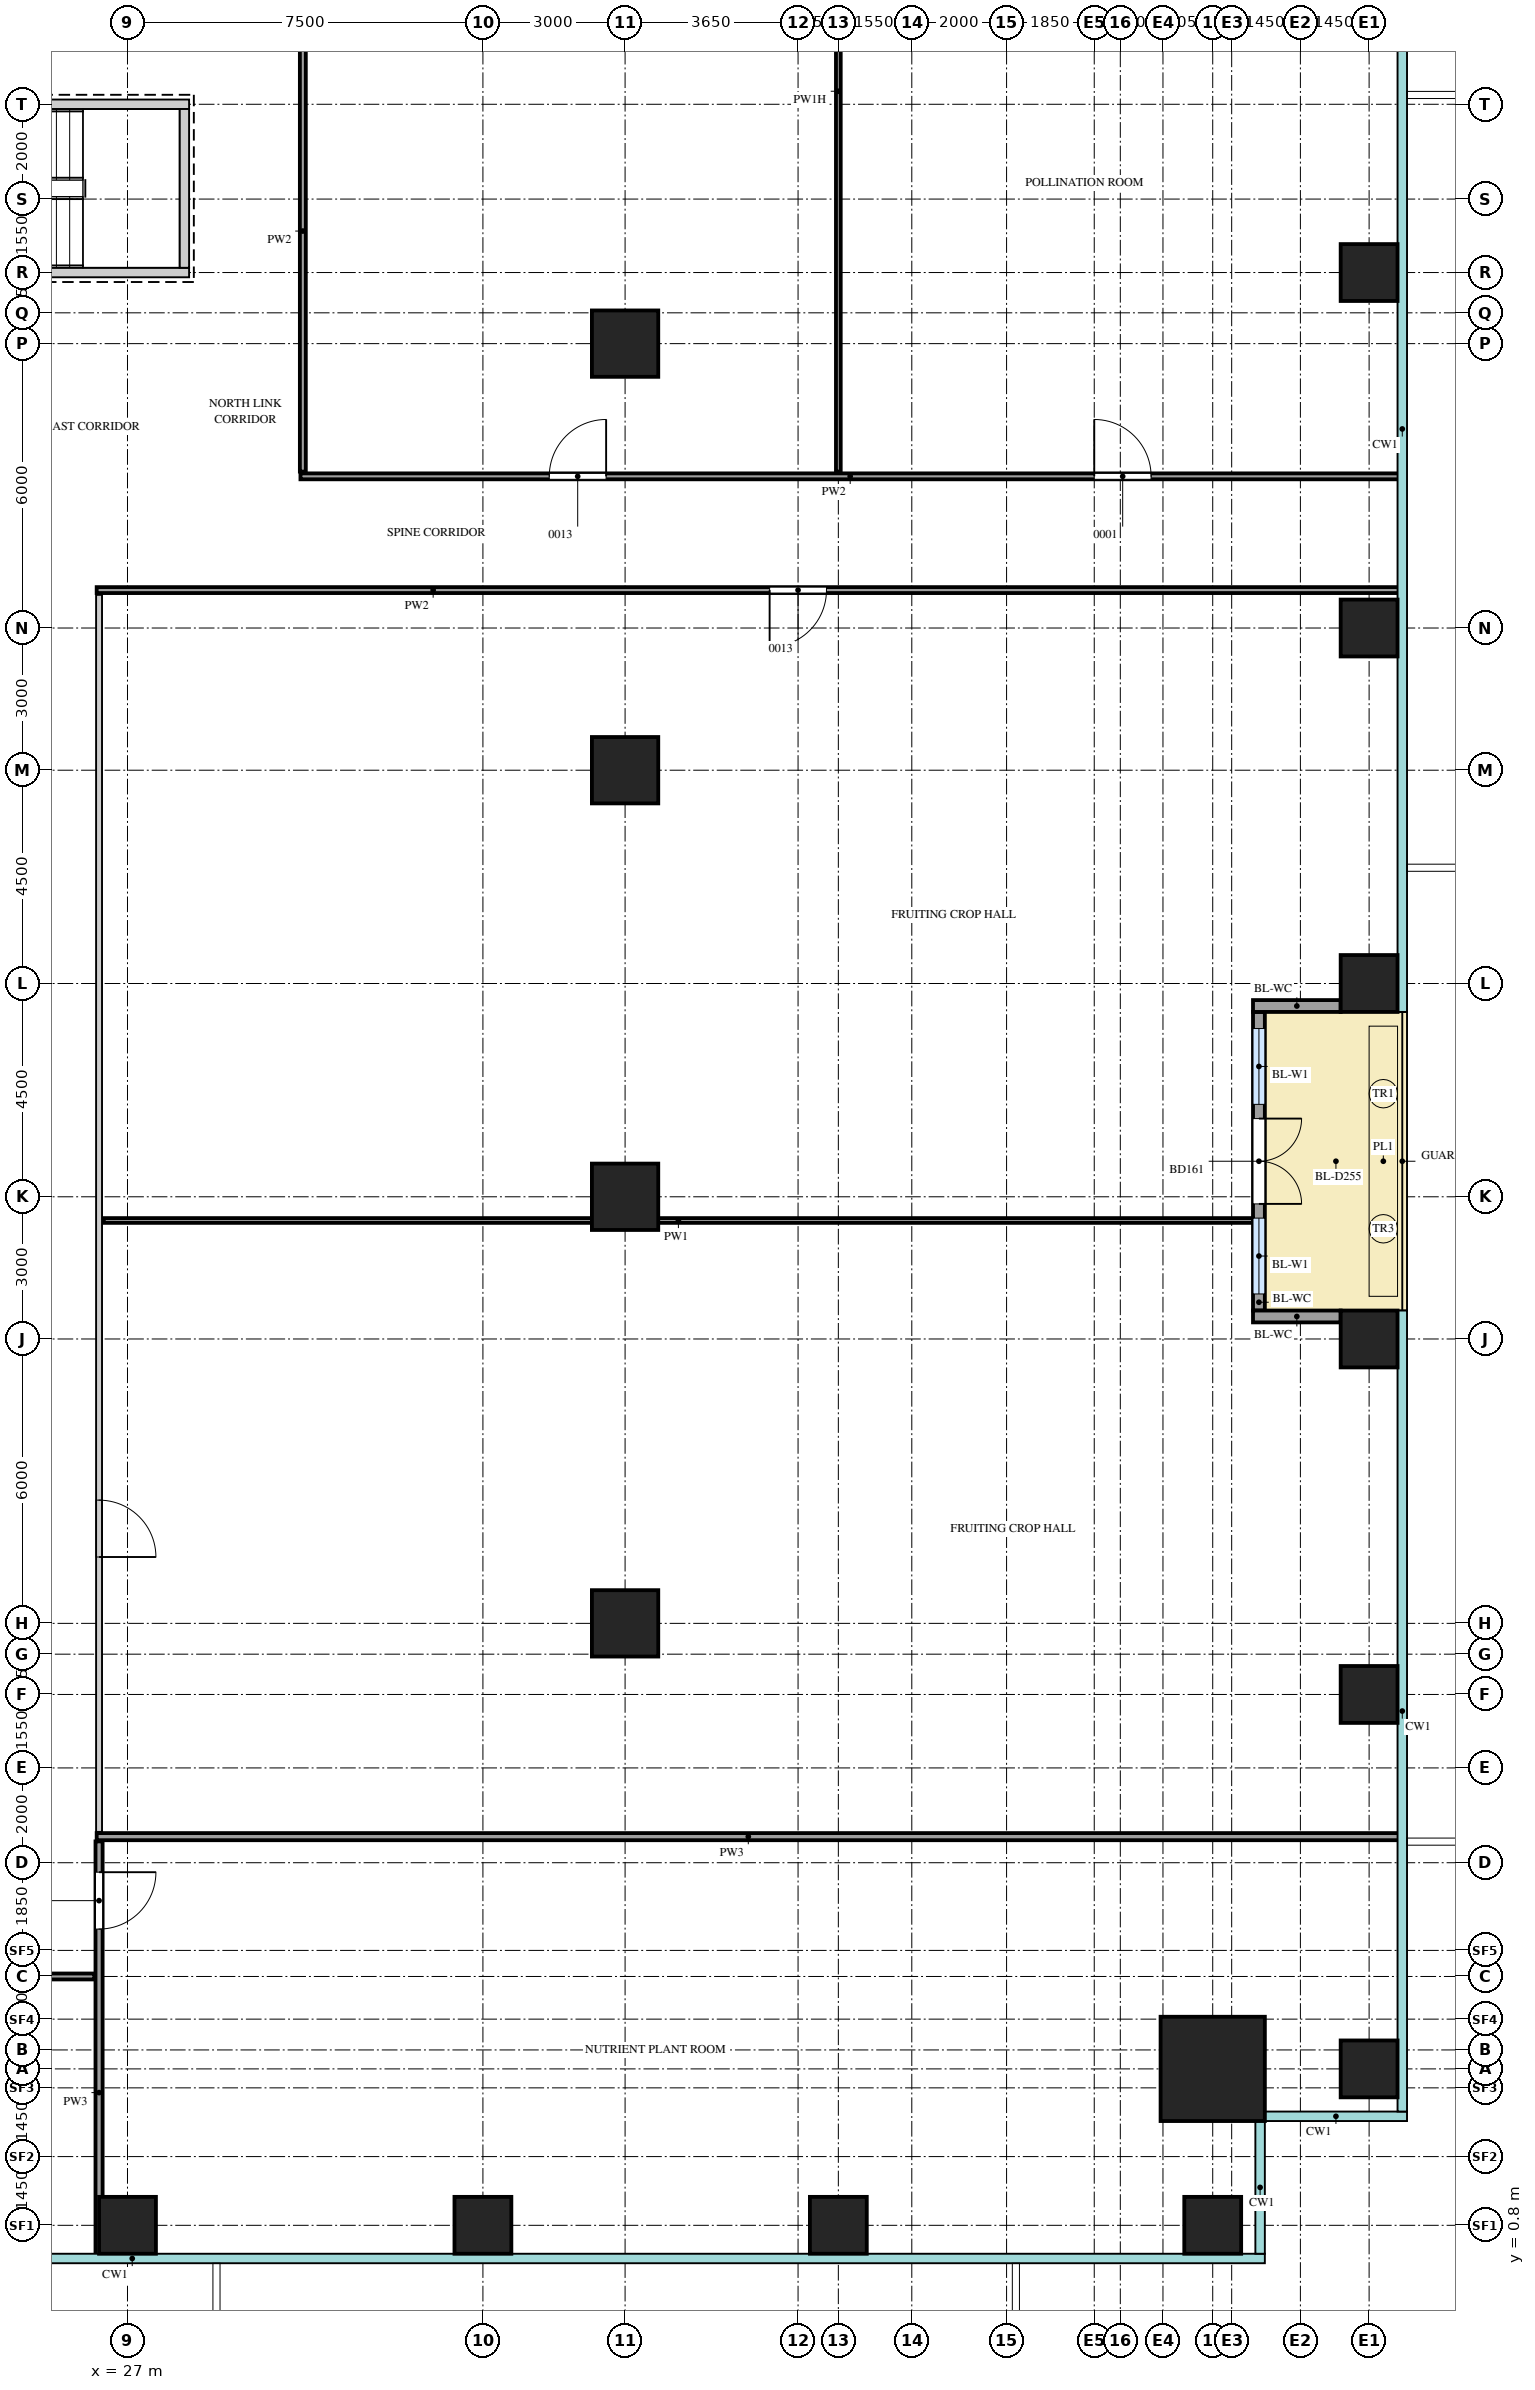
"""IFC4 building model, lengths in metres.
Left out: names, types, materials, properties, quantities, classifications, styles, units other than length and angle.
Written with IfcOpenShell. Run it as: python <this file> out.ifc"""

import sys

from ifc_helpers import new_model, si_unit, direction, frame, frame_2d, origin, origin_2d, place, context, subcontext, project, spatial, rectangle, extrude, source, transform, mapped, element, fill, save


model = new_model("IFC4")
c1 = context("Model", 3, precision=1e-05, world=origin(), true_north=direction((0.0, 1.0)))
c2 = subcontext(c1, "Body", "Model", "MODEL_VIEW")
j1 = project(units=[si_unit("LENGTHUNIT", "METRE"), si_unit("PLANEANGLEUNIT", "RADIAN")], contexts=[c1])
p1 = place(None, origin())
s1 = spatial("IfcSite", under=j1, at=p1, CompositionType="ELEMENT")
p2 = place(p1, origin())
s2 = spatial("IfcBuilding", under=s1, at=p2, CompositionType="ELEMENT")
p3 = place(p2, frame((0.0, 0.0, 78.0)))
s3 = spatial("IfcBuildingStorey", under=s2, at=p3, CompositionType="ELEMENT", Elevation=78.0)
m1 = source(origin(), c2, "Body", "SweptSolid", [
    extrude(rectangle(XDim=7.1, YDim=0.2, at=frame_2d((3.55, 0.0))), origin(), (0.0, 0.0, 1.0), 4.2),
])
p4 = place(p3, frame((21.2, 45.55, 0.0), z_axis=(0.0, 0.0, 1.0), x_axis=(1.0, 0.0, 0.0)))
e1 = element("IfcWall", 1, at=p4, inside=s3, PredefinedType="SHEAR", context=c2, shape_type="MappedRepresentation", body=[
    mapped(m1, transform((0.0, 0.0, 0.0))),
])
m2 = source(origin(), c2, "Body", "SweptSolid", [
    extrude(rectangle(XDim=1.2, YDim=2.1, at=frame_2d((0.6, 1.05))), frame((0.0, 0.11, 0.0), z_axis=(0.0, -1.0, 0.0), x_axis=(1.0, 0.0, 0.0)), (0.0, 0.0, 1.0), 0.22),
])
p5 = place(p4, frame((0.15, 0.0, 0.0)))
e2 = element("IfcOpeningElement", 2, at=p5, cuts=e1, PredefinedType="OPENING", context=c2, shape_type="MappedRepresentation", body=[
    mapped(m2, transform((0.0, 0.0, 0.0))),
])
p6 = place(p3, frame((21.2, 42.0, 0.0), z_axis=(0.0, 0.0, 1.0), x_axis=(1.0, 0.0, 0.0)))
e3 = element("IfcWall", 3, at=p6, inside=s3, PredefinedType="SHEAR", context=c2, shape_type="MappedRepresentation", body=[
    mapped(m1, transform((0.0, 0.0, 0.0))),
])
m3 = source(origin(), c2, "Body", "SweptSolid", [
    extrude(rectangle(XDim=3.35, YDim=0.2, at=frame_2d((1.675, 0.0))), origin(), (0.0, 0.0, 1.0), 4.2),
])
p7 = place(p3, frame((28.2, 42.1, 0.0), z_axis=(0.0, 0.0, 1.0), x_axis=(0.0, 1.0, 0.0)))
e4 = element("IfcWall", 4, at=p7, inside=s3, PredefinedType="SHEAR", context=c2, shape_type="MappedRepresentation", body=[
    mapped(m3, transform((0.0, 0.0, 0.0))),
])
m4 = source(origin(), c2, "Body", "SweptSolid", [
    extrude(rectangle(XDim=2.2, YDim=2.2, at=origin_2d()), origin(), (0.0, 0.0, 1.0), 4.5),
])
p8 = place(p3, frame((49.9, 4.1, 0.0), z_axis=(0.0, 0.0, 1.0), x_axis=(1.0, 0.0, 0.0)))
e5 = element("IfcColumn", 5, at=p8, inside=s3, PredefinedType="COLUMN", context=c2, shape_type="MappedRepresentation", body=[
    mapped(m4, transform((0.0, 0.0, 0.0))),
])
m5 = source(origin(), c2, "Body", "SweptSolid", [
    extrude(rectangle(XDim=1.2, YDim=1.2, at=origin_2d()), origin(), (0.0, 0.0, 1.0), 4.2),
])
for number, where, z_axis, x_axis in (
    (6, (27.0, 0.8, 0.0), (0.0, 0.0, 1.0), (1.0, 0.0, 0.0)),
    (7, (34.5, 0.8, 0.0), (0.0, 0.0, 1.0), (1.0, 0.0, 0.0)),
    (8, (42.0, 0.8, 0.0), (0.0, 0.0, 1.0), (1.0, 0.0, 0.0)),
    (9, (49.9, 0.8, 0.0), (0.0, 0.0, 1.0), (1.0, 0.0, 0.0)),
    (10, (53.2, 4.1, 0.0), (0.0, 0.0, 1.0), (1.0, 0.0, 0.0)),
    (11, (53.2, 12.0, 0.0), (0.0, 0.0, 1.0), (1.0, 0.0, 0.0)),
    (12, (53.2, 19.5, 0.0), (0.0, 0.0, 1.0), (1.0, 0.0, 0.0)),
    (13, (53.2, 27.0, 0.0), (0.0, 0.0, 1.0), (1.0, 0.0, 0.0)),
    (14, (53.2, 34.5, 0.0), (0.0, 0.0, 1.0), (1.0, 0.0, 0.0)),
    (15, (53.2, 42.0, 0.0), (0.0, 0.0, 1.0), (1.0, 0.0, 0.0)),
):
    element("IfcColumn", number, at=place(p3, frame(where, z_axis=z_axis, x_axis=x_axis)), inside=s3, PredefinedType="COLUMN", context=c2, shape_type="MappedRepresentation", body=[
        mapped(m5, transform((0.0, 0.0, 0.0))),
    ])
m6 = source(origin(), c2, "Body", "SweptSolid", [
    extrude(rectangle(XDim=1.4, YDim=1.4, at=origin_2d()), origin(), (0.0, 0.0, 1.0), 4.2),
])
for number, where, z_axis, x_axis in (
    (16, (37.5, 13.5, 0.0), (0.0, 0.0, 1.0), (1.0, 0.0, 0.0)),
    (17, (37.5, 22.5, 0.0), (0.0, 0.0, 1.0), (1.0, 0.0, 0.0)),
    (18, (37.5, 31.5, 0.0), (0.0, 0.0, 1.0), (1.0, 0.0, 0.0)),
    (19, (37.5, 40.5, 0.0), (0.0, 0.0, 1.0), (1.0, 0.0, 0.0)),
):
    element("IfcColumn", number, at=place(p3, frame(where, z_axis=z_axis, x_axis=x_axis)), inside=s3, PredefinedType="COLUMN", context=c2, shape_type="MappedRepresentation", body=[
        mapped(m6, transform((0.0, 0.0, 0.0))),
    ])
m7 = source(origin(), c2, "Body", "SweptSolid", [
    extrude(rectangle(XDim=6.3, YDim=0.25, at=frame_2d((3.15, 0.0))), origin(), (0.0, 0.0, 1.0), 3.6),
])
p9 = place(p3, frame((50.875, 20.1, 0.0), z_axis=(0.0, 0.0, 1.0), x_axis=(0.0, 1.0, 0.0)))
e20 = element("IfcWall", 20, at=p9, inside=s3, PredefinedType="SOLIDWALL", context=c2, shape_type="MappedRepresentation", body=[
    mapped(m7, transform((0.0, 0.0, 0.0))),
])
m8 = source(origin(), c2, "Body", "SweptSolid", [
    extrude(rectangle(XDim=1.6, YDim=2.4, at=frame_2d((0.8, 1.2))), frame((0.0, 0.135, 0.0), z_axis=(0.0, -1.0, 0.0), x_axis=(1.0, 0.0, 0.0)), (0.0, 0.0, 1.0), 0.27),
])
p10 = place(p9, frame((0.35, 0.0, 0.0)))
e21 = element("IfcOpeningElement", 21, at=p10, cuts=e20, PredefinedType="OPENING", context=c2, shape_type="MappedRepresentation", body=[
    mapped(m8, transform((0.0, 0.0, 0.0))),
])
p11 = place(p9, frame((4.35, 0.0, 0.0)))
e22 = element("IfcOpeningElement", 22, at=p11, cuts=e20, PredefinedType="OPENING", context=c2, shape_type="MappedRepresentation", body=[
    mapped(m8, transform((0.0, 0.0, 0.0))),
])
m9 = source(origin(), c2, "Body", "SweptSolid", [
    extrude(rectangle(XDim=1.8, YDim=2.4, at=frame_2d((0.9, 1.2))), frame((0.0, 0.135, 0.0), z_axis=(0.0, -1.0, 0.0), x_axis=(1.0, 0.0, 0.0)), (0.0, 0.0, 1.0), 0.27),
])
p12 = place(p9, frame((2.25, 0.0, 0.0)))
e23 = element("IfcOpeningElement", 23, at=p12, cuts=e20, PredefinedType="OPENING", context=c2, shape_type="MappedRepresentation", body=[
    mapped(m9, transform((0.0, 0.0, 0.0))),
])
m10 = source(origin(), c2, "Body", "SweptSolid", [
    extrude(rectangle(XDim=1.85, YDim=0.25, at=frame_2d((0.925, 0.0))), origin(), (0.0, 0.0, 1.0), 3.6),
])
for number, where, z_axis, x_axis in (
    (24, (52.6, 19.975, 0.0), (0.0, 0.0, 1.0), (-1.0, 0.0, 0.0)),
    (25, (52.6, 26.525, 0.0), (0.0, 0.0, 1.0), (-1.0, 0.0, 0.0)),
):
    element("IfcWall", number, at=place(p3, frame(where, z_axis=z_axis, x_axis=x_axis)), inside=s3, PredefinedType="SOLIDWALL", context=c2, shape_type="MappedRepresentation", body=[
        mapped(m10, transform((0.0, 0.0, 0.0))),
    ])
m11 = source(origin(), c2, "Body", "SweptSolid", [
    extrude(rectangle(XDim=8.75, YDim=0.15, at=frame_2d((4.375, 0.0))), origin(), (0.0, 0.0, 1.0), 4.3),
])
p13 = place(p3, frame((26.4, 0.15, 0.0), z_axis=(0.0, 0.0, 1.0), x_axis=(0.0, 1.0, 0.0)))
e26 = element("IfcWall", 26, at=p13, inside=s3, PredefinedType="PARTITIONING", context=c2, shape_type="MappedRepresentation", body=[
    mapped(m11, transform((0.0, 0.0, 0.0))),
])
m12 = source(origin(), c2, "Body", "SweptSolid", [
    extrude(rectangle(XDim=1.2, YDim=2.1, at=frame_2d((0.6, 1.05))), frame((0.0, 0.085, 0.0), z_axis=(0.0, -1.0, 0.0), x_axis=(1.0, 0.0, 0.0)), (0.0, 0.0, 1.0), 0.17),
])
p14 = place(p13, frame((6.9, 0.0, 0.0)))
e27 = element("IfcOpeningElement", 27, at=p14, cuts=e26, PredefinedType="OPENING", context=c2, shape_type="MappedRepresentation", body=[
    mapped(m12, transform((0.0, 0.0, 0.0))),
])
m13 = source(origin(), c2, "Body", "SweptSolid", [
    extrude(rectangle(XDim=22.15, YDim=0.125, at=frame_2d((11.075, 0.0))), origin(), (0.0, 0.0, 1.0), 4.3),
])
p15 = place(p3, frame((4.15, 6.05, 0.0), z_axis=(0.0, 0.0, 1.0), x_axis=(1.0, 0.0, 0.0)))
e28 = element("IfcWall", 28, at=p15, inside=s3, PredefinedType="PARTITIONING", context=c2, shape_type="MappedRepresentation", body=[
    mapped(m13, transform((0.0, 0.0, 0.0))),
])
m14 = source(origin(), c2, "Body", "SweptSolid", [
    extrude(rectangle(XDim=1.2, YDim=2.1, at=frame_2d((0.6, 1.05))), frame((0.0, 0.073, 0.0), z_axis=(0.0, -1.0, 0.0), x_axis=(1.0, 0.0, 0.0)), (0.0, 0.0, 1.0), 0.145),
])
p16 = place(p15, frame((9.2, 0.0, 0.0)))
e29 = element("IfcOpeningElement", 29, at=p16, cuts=e28, PredefinedType="OPENING", context=c2, shape_type="MappedRepresentation", body=[
    mapped(m14, transform((0.0, 0.0, 0.0))),
])
m15 = source(origin(), c2, "Body", "SweptSolid", [
    extrude(rectangle(XDim=27.5, YDim=0.15, at=frame_2d((13.75, 0.0))), origin(), (0.0, 0.0, 1.0), 4.3),
])
p17 = place(p3, frame((26.35, 9.0, 0.0), z_axis=(0.0, 0.0, 1.0), x_axis=(1.0, 0.0, 0.0)))
e30 = element("IfcWall", 30, at=p17, inside=s3, PredefinedType="PARTITIONING", context=c2, shape_type="MappedRepresentation", body=[
    mapped(m15, transform((0.0, 0.0, 0.0))),
])
m16 = source(origin(), c2, "Body", "SweptSolid", [
    extrude(rectangle(XDim=26.1, YDim=0.125, at=frame_2d((13.05, 0.0))), origin(), (0.0, 0.0, 1.0), 4.3),
])
p18 = place(p3, frame((26.4, 9.1, 0.0), z_axis=(0.0, 0.0, 1.0), x_axis=(0.0, 1.0, 0.0)))
e31 = element("IfcWall", 31, at=p18, inside=s3, PredefinedType="PARTITIONING", context=c2, shape_type="MappedRepresentation", body=[
    mapped(m16, transform((0.0, 0.0, 0.0))),
])
p19 = place(p18, frame((5.8, 0.0, 0.0)))
e32 = element("IfcOpeningElement", 32, at=p19, cuts=e31, PredefinedType="OPENING", context=c2, shape_type="MappedRepresentation", body=[
    mapped(m14, transform((0.0, 0.0, 0.0))),
])
m17 = source(origin(), c2, "Body", "SweptSolid", [
    extrude(rectangle(XDim=24.25, YDim=0.1, at=frame_2d((12.125, 0.0))), origin(), (0.0, 0.0, 1.0), 4.3),
])
p20 = place(p3, frame((26.5, 22.0, 0.0), z_axis=(0.0, 0.0, 1.0), x_axis=(1.0, 0.0, 0.0)))
e33 = element("IfcWall", 33, at=p20, inside=s3, PredefinedType="PARTITIONING", context=c2, shape_type="MappedRepresentation", body=[
    mapped(m17, transform((0.0, 0.0, 0.0))),
])
m18 = source(origin(), c2, "Body", "SweptSolid", [
    extrude(rectangle(XDim=27.5, YDim=0.125, at=frame_2d((13.75, 0.0))), origin(), (0.0, 0.0, 1.0), 4.3),
])
p21 = place(p3, frame((26.35, 35.3, 0.0), z_axis=(0.0, 0.0, 1.0), x_axis=(1.0, 0.0, 0.0)))
e34 = element("IfcWall", 34, at=p21, inside=s3, PredefinedType="PARTITIONING", context=c2, shape_type="MappedRepresentation", body=[
    mapped(m18, transform((0.0, 0.0, 0.0))),
])
p22 = place(p21, frame((14.2, 0.0, 0.0)))
e35 = element("IfcOpeningElement", 35, at=p22, cuts=e34, PredefinedType="OPENING", context=c2, shape_type="MappedRepresentation", body=[
    mapped(m14, transform((0.0, 0.0, 0.0))),
])
m19 = source(origin(), c2, "Body", "SweptSolid", [
    extrude(rectangle(XDim=23.2, YDim=0.125, at=frame_2d((11.6, 0.0))), origin(), (0.0, 0.0, 1.0), 4.3),
])
p23 = place(p3, frame((30.65, 37.7, 0.0), z_axis=(0.0, 0.0, 1.0), x_axis=(1.0, 0.0, 0.0)))
e36 = element("IfcWall", 36, at=p23, inside=s3, PredefinedType="PARTITIONING", context=c2, shape_type="MappedRepresentation", body=[
    mapped(m19, transform((0.0, 0.0, 0.0))),
])
p24 = place(p23, frame((5.25, 0.0, 0.0)))
e37 = element("IfcOpeningElement", 37, at=p24, cuts=e36, PredefinedType="OPENING", context=c2, shape_type="MappedRepresentation", body=[
    mapped(m14, transform((0.0, 0.0, 0.0))),
])
p25 = place(p23, frame((16.75, 0.0, 0.0)))
e38 = element("IfcOpeningElement", 38, at=p25, cuts=e36, PredefinedType="OPENING", context=c2, shape_type="MappedRepresentation", body=[
    mapped(m14, transform((0.0, 0.0, 0.0))),
])
m20 = source(origin(), c2, "Body", "SweptSolid", [
    extrude(rectangle(XDim=10.15, YDim=0.125, at=frame_2d((5.075, 0.0))), origin(), (0.0, 0.0, 1.0), 4.3),
])
p26 = place(p3, frame((30.7, 37.8, 0.0), z_axis=(0.0, 0.0, 1.0), x_axis=(0.0, 1.0, 0.0)))
e39 = element("IfcWall", 39, at=p26, inside=s3, PredefinedType="PARTITIONING", context=c2, shape_type="MappedRepresentation", body=[
    mapped(m20, transform((0.0, 0.0, 0.0))),
])
m21 = source(origin(), c2, "Body", "SweptSolid", [
    extrude(rectangle(XDim=16.05, YDim=0.1, at=frame_2d((8.025, 0.0))), origin(), (0.0, 0.0, 1.0), 3.7),
])
p27 = place(p3, frame((42.0, 37.8, 0.0), z_axis=(0.0, 0.0, 1.0), x_axis=(0.0, 1.0, 0.0)))
e40 = element("IfcWall", 40, at=p27, inside=s3, PredefinedType="PARTITIONING", context=c2, shape_type="MappedRepresentation", body=[
    mapped(m21, transform((0.0, 0.0, 0.0))),
])
m22 = source(origin(), c2, "Body", "SweptSolid", [
    extrude(rectangle(XDim=1.6, YDim=2.4, at=frame_2d((0.8, 1.2))), frame((0.0, 0.03, 0.0), z_axis=(0.0, -1.0, 0.0), x_axis=(1.0, 0.0, 0.0)), (0.0, 0.0, 1.0), 0.06),
])
p28 = place(p10, origin())
e41 = element("IfcWindow", 41, at=p28, inside=s3, PartitioningType="SINGLE_PANEL", PredefinedType="WINDOW", context=c2, shape_type="MappedRepresentation", body=[
    mapped(m22, transform((0.0, 0.0, 0.0))),
])
fill(e21, e41)
p29 = place(p11, origin())
e42 = element("IfcWindow", 42, at=p29, inside=s3, PartitioningType="SINGLE_PANEL", PredefinedType="WINDOW", context=c2, shape_type="MappedRepresentation", body=[
    mapped(m22, transform((0.0, 0.0, 0.0))),
])
fill(e22, e42)
m23 = source(origin(), c2, "Body", "SweptSolid", [
    extrude(rectangle(XDim=1.8, YDim=2.4, at=frame_2d((0.9, 1.2))), frame((0.0, 0.025, 0.0), z_axis=(0.0, -1.0, 0.0), x_axis=(1.0, 0.0, 0.0)), (0.0, 0.0, 1.0), 0.05),
])
p30 = place(p12, origin())
e43 = element("IfcDoor", 43, at=p30, inside=s3, OperationType="DOUBLE_DOOR_DOUBLE_SWING", PredefinedType="DOOR", context=c2, shape_type="MappedRepresentation", body=[
    mapped(m23, transform((0.0, 0.0, 0.0))),
])
fill(e23, e43)
m24 = source(origin(), c2, "Body", "SweptSolid", [
    extrude(rectangle(XDim=1.2, YDim=2.1, at=frame_2d((0.6, 1.05))), frame((0.0, 0.025, 0.0), z_axis=(0.0, -1.0, 0.0), x_axis=(1.0, 0.0, 0.0)), (0.0, 0.0, 1.0), 0.05),
])
p31 = place(p14, origin())
e44 = element("IfcDoor", 44, at=p31, inside=s3, OperationType="SINGLE_SWING_RIGHT", PredefinedType="DOOR", context=c2, shape_type="MappedRepresentation", body=[
    mapped(m24, transform((0.0, 0.0, 0.0))),
])
fill(e27, e44)
p32 = place(p19, origin())
e45 = element("IfcDoor", 45, at=p32, inside=s3, OperationType="SINGLE_SWING_LEFT", PredefinedType="DOOR", context=c2, shape_type="MappedRepresentation", body=[
    mapped(m24, transform((0.0, 0.0, 0.0))),
])
fill(e32, e45)
p33 = place(p22, origin())
e46 = element("IfcDoor", 46, at=p33, inside=s3, OperationType="SINGLE_SWING_LEFT", PredefinedType="DOOR", context=c2, shape_type="MappedRepresentation", body=[
    mapped(m24, transform((0.0, 0.0, 0.0))),
])
fill(e35, e46)
p34 = place(p24, origin())
e47 = element("IfcDoor", 47, at=p34, inside=s3, OperationType="SINGLE_SWING_LEFT", PredefinedType="DOOR", context=c2, shape_type="MappedRepresentation", body=[
    mapped(m24, transform((0.0, 0.0, 0.0))),
])
fill(e37, e47)
p35 = place(p25, origin())
e48 = element("IfcDoor", 48, at=p35, inside=s3, OperationType="SINGLE_SWING_RIGHT", PredefinedType="DOOR", context=c2, shape_type="MappedRepresentation", body=[
    mapped(m24, transform((0.0, 0.0, 0.0))),
])
fill(e38, e48)
save(model, sys.argv[1])
